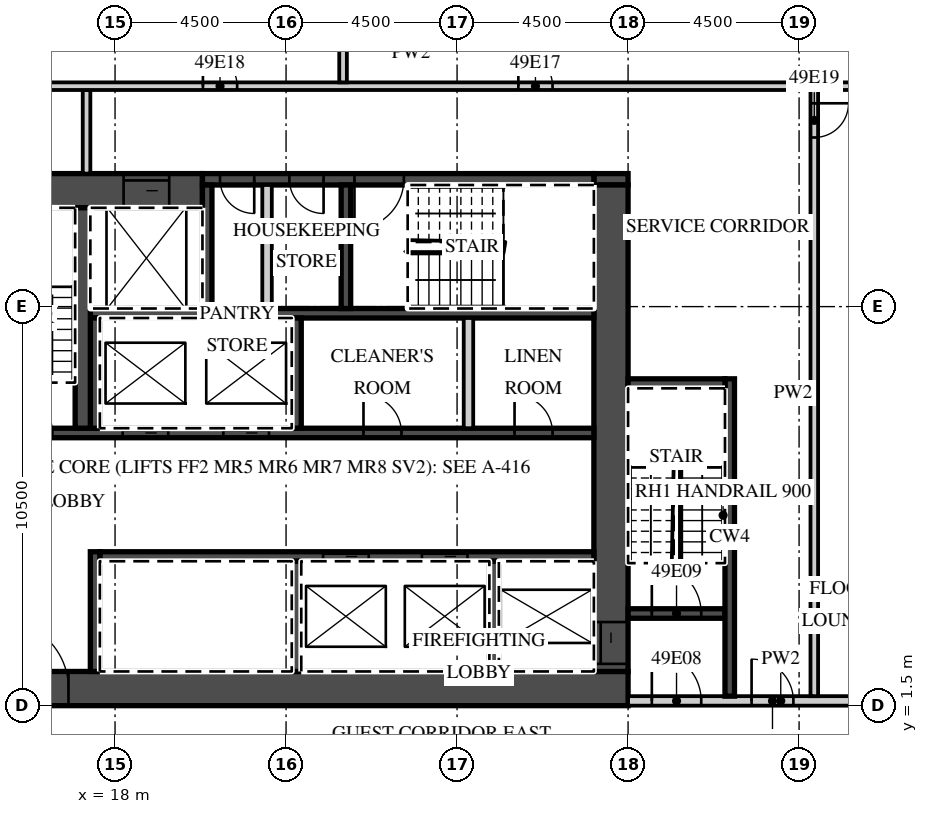
"""IFC4 building model, lengths in metres.
Left out: names, types, materials, properties, quantities, classifications, styles, units other than length and angle.
Written with IfcOpenShell. Run it as: python <this file> out.ifc"""

import sys

from ifc_helpers import new_model, si_unit, direction, frame, frame_2d, origin, place, context, subcontext, project, spatial, rectangle, extrude, element, fill, save


model = new_model("IFC4")
c1 = context("Model", 3, precision=1e-05, world=origin(), true_north=direction((0.0, 1.0)))
c2 = subcontext(c1, "Body", "Model", "MODEL_VIEW")
j1 = project(units=[si_unit("LENGTHUNIT", "METRE"), si_unit("PLANEANGLEUNIT", "RADIAN")], contexts=[c1])
p1 = place(None, origin())
s1 = spatial("IfcSite", under=j1, at=p1, CompositionType="ELEMENT")
p2 = place(p1, origin())
s2 = spatial("IfcBuilding", under=s1, at=p2, CompositionType="ELEMENT")
p3 = place(p2, frame((0.0, 0.0, 203.2)))
s3 = spatial("IfcBuildingStorey", under=s2, at=p3, CompositionType="ELEMENT", Elevation=203.2)
p4 = place(p3, frame((13.5, 1.95, 0.0), z_axis=(0.0, 0.0, 1.0), x_axis=(1.0, 0.0, 0.0)))
e1 = element("IfcWall", 1, at=p4, inside=s3, PredefinedType="SHEAR", context=c2, shape_type="SweptSolid", body=[
    extrude(rectangle(XDim=18.0, YDim=0.9, at=frame_2d((9.0, 0.0))), origin(), (0.0, 0.0, 1.0), 3.0),
])
p5 = place(p4, frame((1.475, 0.0, 0.0)))
e2 = element("IfcOpeningElement", 2, at=p5, cuts=e1, PredefinedType="OPENING", context=c2, shape_type="SweptSolid", body=[
    extrude(rectangle(XDim=1.8, YDim=2.1, at=frame_2d((0.9, 1.05))), frame((0.0, 0.46, 0.0), z_axis=(0.0, -1.0, 0.0), x_axis=(1.0, 0.0, 0.0)), (0.0, 0.0, 1.0), 0.92),
])
p6 = place(p3, frame((13.5, 15.05, 0.0), z_axis=(0.0, 0.0, 1.0), x_axis=(1.0, 0.0, 0.0)))
e3 = element("IfcWall", 3, at=p6, inside=s3, PredefinedType="SHEAR", context=c2, shape_type="SweptSolid", body=[
    extrude(rectangle(XDim=6.8, YDim=0.9, at=frame_2d((3.4, 0.0))), origin(), (0.0, 0.0, 1.0), 3.0),
])
p7 = place(p6, frame((4.725, 0.0, 0.0)))
e4 = element("IfcOpeningElement", 4, at=p7, cuts=e3, PredefinedType="OPENING", context=c2, shape_type="SweptSolid", body=[
    extrude(rectangle(XDim=1.2, YDim=2.1, at=frame_2d((0.6, 1.05))), frame((0.0, 0.46, 0.0), z_axis=(0.0, -1.0, 0.0), x_axis=(1.0, 0.0, 0.0)), (0.0, 0.0, 1.0), 0.92),
])
p8 = place(p3, frame((30.6, 15.35, 0.0), z_axis=(0.0, 0.0, 1.0), x_axis=(1.0, 0.0, 0.0)))
e5 = element("IfcWall", 5, at=p8, inside=s3, PredefinedType="SHEAR", context=c2, shape_type="SweptSolid", body=[
    extrude(rectangle(XDim=0.9, YDim=0.3, at=frame_2d((0.45, 0.0))), origin(), (0.0, 0.0, 1.0), 3.0),
])
p9 = place(p3, frame((20.3, 15.35, 0.0), z_axis=(0.0, 0.0, 1.0), x_axis=(1.0, 0.0, 0.0)))
e6 = element("IfcWall", 6, at=p9, inside=s3, PredefinedType="SHEAR", context=c2, shape_type="SweptSolid", body=[
    extrude(rectangle(XDim=10.3, YDim=0.3, at=frame_2d((5.15, 0.0))), origin(), (0.0, 0.0, 1.0), 3.0),
])
p10 = place(p9, frame((4.0, 0.0, 0.0)))
e7 = element("IfcOpeningElement", 7, at=p10, cuts=e6, PredefinedType="OPENING", context=c2, shape_type="SweptSolid", body=[
    extrude(rectangle(XDim=1.3, YDim=2.1, at=frame_2d((0.65, 1.05))), frame((0.0, 0.16, 0.0), z_axis=(0.0, -1.0, 0.0), x_axis=(1.0, 0.0, 0.0)), (0.0, 0.0, 1.0), 0.32),
])
p11 = place(p9, frame((2.288, 0.0, 0.0)))
e8 = element("IfcOpeningElement", 8, at=p11, cuts=e6, PredefinedType="OPENING", context=c2, shape_type="SweptSolid", body=[
    extrude(rectangle(XDim=0.9, YDim=2.1, at=frame_2d((0.45, 1.05))), frame((0.0, 0.16, 0.0), z_axis=(0.0, -1.0, 0.0), x_axis=(1.0, 0.0, 0.0)), (0.0, 0.0, 1.0), 0.32),
])
p12 = place(p9, frame((0.462, 0.0, 0.0)))
e9 = element("IfcOpeningElement", 9, at=p12, cuts=e6, PredefinedType="OPENING", context=c2, shape_type="SweptSolid", body=[
    extrude(rectangle(XDim=0.9, YDim=2.1, at=frame_2d((0.45, 1.05))), frame((0.0, 0.16, 0.0), z_axis=(0.0, -1.0, 0.0), x_axis=(1.0, 0.0, 0.0)), (0.0, 0.0, 1.0), 0.32),
])
p13 = place(p3, frame((31.05, 2.4, 0.0), z_axis=(0.0, 0.0, 1.0), x_axis=(0.0, 1.0, 0.0)))
e10 = element("IfcWall", 10, at=p13, inside=s3, PredefinedType="SHEAR", context=c2, shape_type="SweptSolid", body=[
    extrude(rectangle(XDim=12.8, YDim=0.9, at=frame_2d((6.4, 0.0))), origin(), (0.0, 0.0, 1.0), 3.0),
])
p14 = place(p13, frame((0.2, 0.0, 0.0)))
e11 = element("IfcOpeningElement", 11, at=p14, cuts=e10, PredefinedType="OPENING", context=c2, shape_type="SweptSolid", body=[
    extrude(rectangle(XDim=1.1, YDim=2.1, at=frame_2d((0.55, 1.05))), frame((0.0, 0.46, 0.0), z_axis=(0.0, -1.0, 0.0), x_axis=(1.0, 0.0, 0.0)), (0.0, 0.0, 1.0), 0.92),
])
p15 = place(p3, frame((17.6, 5.425, 0.0), z_axis=(0.0, 0.0, 1.0), x_axis=(1.0, 0.0, 0.0)))
e12 = element("IfcWall", 12, at=p15, inside=s3, PredefinedType="SHEAR", context=c2, shape_type="SweptSolid", body=[
    extrude(rectangle(XDim=13.0, YDim=0.25, at=frame_2d((6.5, 0.0))), origin(), (0.0, 0.0, 1.0), 3.0),
])
p16 = place(p15, frame((8.475, 0.0, 0.0)))
e13 = element("IfcOpeningElement", 13, at=p16, cuts=e12, PredefinedType="OPENING", context=c2, shape_type="SweptSolid", body=[
    extrude(rectangle(XDim=1.2, YDim=2.1, at=frame_2d((0.6, 1.05))), frame((0.0, 0.135, 0.0), z_axis=(0.0, -1.0, 0.0), x_axis=(1.0, 0.0, 0.0)), (0.0, 0.0, 1.0), 0.27),
])
p17 = place(p15, frame((5.875, 0.0, 0.0)))
e14 = element("IfcOpeningElement", 14, at=p17, cuts=e12, PredefinedType="OPENING", context=c2, shape_type="SweptSolid", body=[
    extrude(rectangle(XDim=1.2, YDim=2.1, at=frame_2d((0.6, 1.05))), frame((0.0, 0.135, 0.0), z_axis=(0.0, -1.0, 0.0), x_axis=(1.0, 0.0, 0.0)), (0.0, 0.0, 1.0), 0.27),
])
p18 = place(p3, frame((17.475, 2.4, 0.0), z_axis=(0.0, 0.0, 1.0), x_axis=(0.0, 1.0, 0.0)))
e15 = element("IfcWall", 15, at=p18, inside=s3, PredefinedType="SHEAR", context=c2, shape_type="SweptSolid", body=[
    extrude(rectangle(XDim=3.15, YDim=0.25, at=frame_2d((1.575, 0.0))), origin(), (0.0, 0.0, 1.0), 3.0),
])
for number, where, z_axis, x_axis in (
    (16, (27.975, 2.4, 0.0), (0.0, 0.0, 1.0), (0.0, 1.0, 0.0)),
    (17, (22.775, 2.4, 0.0), (0.0, 0.0, 1.0), (0.0, 1.0, 0.0)),
):
    element("IfcWall", number, at=place(p3, frame(where, z_axis=z_axis, x_axis=x_axis)), inside=s3, PredefinedType="SHEAR", context=c2, shape_type="SweptSolid", body=[
        extrude(rectangle(XDim=2.9, YDim=0.25, at=frame_2d((1.45, 0.0))), origin(), (0.0, 0.0, 1.0), 3.0),
    ])
p19 = place(p3, frame((14.4, 8.675, 0.0), z_axis=(0.0, 0.0, 1.0), x_axis=(1.0, 0.0, 0.0)))
e18 = element("IfcWall", 18, at=p19, inside=s3, PredefinedType="SHEAR", context=c2, shape_type="SweptSolid", body=[
    extrude(rectangle(XDim=16.2, YDim=0.25, at=frame_2d((8.1, 0.0))), origin(), (0.0, 0.0, 1.0), 3.0),
])
p20 = place(p19, frame((6.45, 0.0, 0.0)))
e19 = element("IfcOpeningElement", 19, at=p20, cuts=e18, PredefinedType="OPENING", context=c2, shape_type="SweptSolid", body=[
    extrude(rectangle(XDim=1.2, YDim=2.1, at=frame_2d((0.6, 1.05))), frame((0.0, 0.135, 0.0), z_axis=(0.0, -1.0, 0.0), x_axis=(1.0, 0.0, 0.0)), (0.0, 0.0, 1.0), 0.27),
])
p21 = place(p19, frame((3.8, 0.0, 0.0)))
e20 = element("IfcOpeningElement", 20, at=p21, cuts=e18, PredefinedType="OPENING", context=c2, shape_type="SweptSolid", body=[
    extrude(rectangle(XDim=1.2, YDim=2.1, at=frame_2d((0.6, 1.05))), frame((0.0, 0.135, 0.0), z_axis=(0.0, -1.0, 0.0), x_axis=(1.0, 0.0, 0.0)), (0.0, 0.0, 1.0), 0.27),
])
p22 = place(p19, frame((0.65, 0.0, 0.0)))
e21 = element("IfcOpeningElement", 21, at=p22, cuts=e18, PredefinedType="OPENING", context=c2, shape_type="SweptSolid", body=[
    extrude(rectangle(XDim=1.3, YDim=2.1, at=frame_2d((0.65, 1.05))), frame((0.0, 0.135, 0.0), z_axis=(0.0, -1.0, 0.0), x_axis=(1.0, 0.0, 0.0)), (0.0, 0.0, 1.0), 0.27),
])
p23 = place(p19, frame((14.113, 0.0, 0.0)))
e22 = element("IfcOpeningElement", 22, at=p23, cuts=e18, PredefinedType="OPENING", context=c2, shape_type="SweptSolid", body=[
    extrude(rectangle(XDim=1.0, YDim=2.1, at=frame_2d((0.5, 1.05))), frame((0.0, 0.135, 0.0), z_axis=(0.0, -1.0, 0.0), x_axis=(1.0, 0.0, 0.0)), (0.0, 0.0, 1.0), 0.27),
])
p24 = place(p19, frame((10.137, 0.0, 0.0)))
e23 = element("IfcOpeningElement", 23, at=p24, cuts=e18, PredefinedType="OPENING", context=c2, shape_type="SweptSolid", body=[
    extrude(rectangle(XDim=1.0, YDim=2.1, at=frame_2d((0.5, 1.05))), frame((0.0, 0.135, 0.0), z_axis=(0.0, -1.0, 0.0), x_axis=(1.0, 0.0, 0.0)), (0.0, 0.0, 1.0), 0.27),
])
p25 = place(p3, frame((17.35, 11.825, 0.0), z_axis=(0.0, 0.0, 1.0), x_axis=(1.0, 0.0, 0.0)))
e24 = element("IfcWall", 24, at=p25, inside=s3, PredefinedType="SHEAR", context=c2, shape_type="SweptSolid", body=[
    extrude(rectangle(XDim=13.25, YDim=0.25, at=frame_2d((6.625, 0.0))), origin(), (0.0, 0.0, 1.0), 3.0),
])
for number, where, z_axis, x_axis in (
    (25, (17.475, 8.8, 0.0), (0.0, 0.0, 1.0), (0.0, 1.0, 0.0)),
    (26, (22.775, 8.8, 0.0), (0.0, 0.0, 1.0), (0.0, 1.0, 0.0)),
):
    element("IfcWall", number, at=place(p3, frame(where, z_axis=z_axis, x_axis=x_axis)), inside=s3, PredefinedType="SHEAR", context=c2, shape_type="SweptSolid", body=[
        extrude(rectangle(XDim=2.9, YDim=0.25, at=frame_2d((1.45, 0.0))), origin(), (0.0, 0.0, 1.0), 3.0),
    ])
p26 = place(p3, frame((27.3, 8.8, 0.0), z_axis=(0.0, 0.0, 1.0), x_axis=(0.0, 1.0, 0.0)))
e27 = element("IfcWall", 27, at=p26, inside=s3, PredefinedType="PARTITIONING", context=c2, shape_type="SweptSolid", body=[
    extrude(rectangle(XDim=2.9, YDim=0.25, at=frame_2d((1.45, 0.0))), origin(), (0.0, 0.0, 1.0), 3.0),
])
p27 = place(p3, frame((17.15, 8.8, 0.0), z_axis=(0.0, 0.0, 1.0), x_axis=(0.0, 1.0, 0.0)))
e28 = element("IfcWall", 28, at=p27, inside=s3, PredefinedType="SHEAR", context=c2, shape_type="SweptSolid", body=[
    extrude(rectangle(XDim=5.8, YDim=0.4, at=frame_2d((2.9, 0.0))), origin(), (0.0, 0.0, 1.0), 3.0),
])
for number, where, z_axis, x_axis in (
    (29, (20.425, 11.95, 0.0), (0.0, 0.0, 1.0), (0.0, 1.0, 0.0)),
    (30, (24.075, 11.95, 0.0), (0.0, 0.0, 1.0), (0.0, 1.0, 0.0)),
):
    element("IfcWall", number, at=place(p3, frame(where, z_axis=z_axis, x_axis=x_axis)), inside=s3, PredefinedType="SHEAR", context=c2, shape_type="SweptSolid", body=[
        extrude(rectangle(XDim=3.25, YDim=0.25, at=frame_2d((1.625, 0.0))), origin(), (0.0, 0.0, 1.0), 3.0),
    ])
p28 = place(p3, frame((22.0, 11.95, 0.0), z_axis=(0.0, 0.0, 1.0), x_axis=(0.0, 1.0, 0.0)))
e31 = element("IfcWall", 31, at=p28, inside=s3, PredefinedType="PARTITIONING", context=c2, shape_type="SweptSolid", body=[
    extrude(rectangle(XDim=3.25, YDim=0.25, at=frame_2d((1.625, 0.0))), origin(), (0.0, 0.0, 1.0), 3.0),
])
p29 = place(p3, frame((31.5, 1.625, 0.0), z_axis=(0.0, 0.0, 1.0), x_axis=(1.0, 0.0, 0.0)))
e32 = element("IfcWall", 32, at=p29, inside=s3, PredefinedType="PARTITIONING", context=c2, shape_type="SweptSolid", body=[
    extrude(rectangle(XDim=8.035, YDim=0.25, at=frame_2d((4.018, 0.0))), origin(), (0.0, 0.0, 1.0), 3.0),
])
p30 = place(p29, frame((0.625, 0.0, 0.0)))
e33 = element("IfcOpeningElement", 33, at=p30, cuts=e32, PredefinedType="OPENING", context=c2, shape_type="SweptSolid", body=[
    extrude(rectangle(XDim=1.3, YDim=2.1, at=frame_2d((0.65, 1.05))), frame((0.0, 0.135, 0.0), z_axis=(0.0, -1.0, 0.0), x_axis=(1.0, 0.0, 0.0)), (0.0, 0.0, 1.0), 0.27),
])
p31 = place(p29, frame((3.25, 0.0, 0.0)))
e34 = element("IfcOpeningElement", 34, at=p31, cuts=e32, PredefinedType="OPENING", context=c2, shape_type="SweptSolid", body=[
    extrude(rectangle(XDim=1.1, YDim=2.1, at=frame_2d((0.55, 1.05))), frame((0.0, 0.135, 0.0), z_axis=(0.0, -1.0, 0.0), x_axis=(1.0, 0.0, 0.0)), (0.0, 0.0, 1.0), 0.27),
])
p32 = place(p3, frame((31.5, 3.925, 0.0), z_axis=(0.0, 0.0, 1.0), x_axis=(1.0, 0.0, 0.0)))
e35 = element("IfcWall", 35, at=p32, inside=s3, PredefinedType="SHEAR", context=c2, shape_type="SweptSolid", body=[
    extrude(rectangle(XDim=2.55, YDim=0.25, at=frame_2d((1.275, 0.0))), origin(), (0.0, 0.0, 1.0), 3.0),
])
p33 = place(p32, frame((0.625, 0.0, 0.0)))
e36 = element("IfcOpeningElement", 36, at=p33, cuts=e35, PredefinedType="OPENING", context=c2, shape_type="SweptSolid", body=[
    extrude(rectangle(XDim=1.3, YDim=2.1, at=frame_2d((0.65, 1.05))), frame((0.0, 0.135, 0.0), z_axis=(0.0, -1.0, 0.0), x_axis=(1.0, 0.0, 0.0)), (0.0, 0.0, 1.0), 0.27),
])
p34 = place(p3, frame((34.175, 1.75, 0.0), z_axis=(0.0, 0.0, 1.0), x_axis=(0.0, 1.0, 0.0)))
e37 = element("IfcWall", 37, at=p34, inside=s3, PredefinedType="SHEAR", context=c2, shape_type="SweptSolid", body=[
    extrude(rectangle(XDim=8.35, YDim=0.25, at=frame_2d((4.175, 0.0))), origin(), (0.0, 0.0, 1.0), 3.0),
])
p35 = place(p3, frame((31.5, 9.975, 0.0), z_axis=(0.0, 0.0, 1.0), x_axis=(1.0, 0.0, 0.0)))
e38 = element("IfcWall", 38, at=p35, inside=s3, PredefinedType="SHEAR", context=c2, shape_type="SweptSolid", body=[
    extrude(rectangle(XDim=2.55, YDim=0.25, at=frame_2d((1.275, 0.0))), origin(), (0.0, 0.0, 1.0), 3.0),
])
p36 = place(p3, frame((17.25, 15.5, 0.0), z_axis=(0.0, 0.0, 1.0), x_axis=(0.0, 1.0, 0.0)))
e39 = element("IfcWall", 39, at=p36, inside=s3, PredefinedType="PARTITIONING", context=c2, shape_type="SweptSolid", body=[
    extrude(rectangle(XDim=2.2, YDim=0.2, at=frame_2d((1.1, 0.0))), origin(), (0.0, 0.0, 1.0), 3.0),
])
p37 = place(p3, frame((36.4, 1.75, 0.0), z_axis=(0.0, 0.0, 1.0), x_axis=(0.0, 1.0, 0.0)))
e40 = element("IfcWall", 40, at=p37, inside=s3, PredefinedType="PARTITIONING", context=c2, shape_type="SweptSolid", body=[
    extrude(rectangle(XDim=15.95, YDim=0.2, at=frame_2d((7.975, 0.0))), origin(), (0.0, 0.0, 1.0), 3.0),
])
p38 = place(p37, frame((14.7, 0.0, 0.0)))
e41 = element("IfcOpeningElement", 41, at=p38, cuts=e40, PredefinedType="OPENING", context=c2, shape_type="SweptSolid", body=[
    extrude(rectangle(XDim=0.9, YDim=2.1, at=frame_2d((0.45, 1.05))), frame((0.0, 0.11, 0.0), z_axis=(0.0, -1.0, 0.0), x_axis=(1.0, 0.0, 0.0)), (0.0, 0.0, 1.0), 0.22),
])
p39 = place(p3, frame((13.6, 17.8, 0.0), z_axis=(0.0, 0.0, 1.0), x_axis=(1.0, 0.0, 0.0)))
e42 = element("IfcWall", 42, at=p39, inside=s3, PredefinedType="PARTITIONING", context=c2, shape_type="SweptSolid", body=[
    extrude(rectangle(XDim=24.378, YDim=0.2, at=frame_2d((12.189, 0.0))), origin(), (0.0, 0.0, 1.0), 3.0),
])
p40 = place(p39, frame((15.012, 0.0, 0.0)))
e43 = element("IfcOpeningElement", 43, at=p40, cuts=e42, PredefinedType="OPENING", context=c2, shape_type="SweptSolid", body=[
    extrude(rectangle(XDim=0.9, YDim=2.1, at=frame_2d((0.45, 1.05))), frame((0.0, 0.11, 0.0), z_axis=(0.0, -1.0, 0.0), x_axis=(1.0, 0.0, 0.0)), (0.0, 0.0, 1.0), 0.22),
])
p41 = place(p39, frame((6.712, 0.0, 0.0)))
e44 = element("IfcOpeningElement", 44, at=p41, cuts=e42, PredefinedType="OPENING", context=c2, shape_type="SweptSolid", body=[
    extrude(rectangle(XDim=0.9, YDim=2.1, at=frame_2d((0.45, 1.05))), frame((0.0, 0.11, 0.0), z_axis=(0.0, -1.0, 0.0), x_axis=(1.0, 0.0, 0.0)), (0.0, 0.0, 1.0), 0.22),
])
p42 = place(p3, frame((24.0, 17.9, 0.0), z_axis=(0.0, 0.0, 1.0), x_axis=(0.0, 1.0, 0.0)))
e45 = element("IfcWall", 45, at=p42, inside=s3, PredefinedType="PARTITIONING", context=c2, shape_type="SweptSolid", body=[
    extrude(rectangle(XDim=4.701, YDim=0.2, at=frame_2d((2.351, 0.0))), origin(), (0.0, 0.0, 1.0), 3.0),
])
p43 = place(p20, origin())
e46 = element("IfcDoor", 46, at=p43, inside=s3, OperationType="SLIDING_TO_LEFT", PredefinedType="DOOR", context=c2, shape_type="SweptSolid", body=[
    extrude(rectangle(XDim=1.2, YDim=2.1, at=frame_2d((0.6, 1.05))), frame((0.0, 0.025, 0.0), z_axis=(0.0, -1.0, 0.0), x_axis=(1.0, 0.0, 0.0)), (0.0, 0.0, 1.0), 0.05),
])
fill(e19, e46)
p44 = place(p21, origin())
e47 = element("IfcDoor", 47, at=p44, inside=s3, OperationType="SLIDING_TO_RIGHT", PredefinedType="DOOR", context=c2, shape_type="SweptSolid", body=[
    extrude(rectangle(XDim=1.2, YDim=2.1, at=frame_2d((0.6, 1.05))), frame((0.0, 0.025, 0.0), z_axis=(0.0, -1.0, 0.0), x_axis=(1.0, 0.0, 0.0)), (0.0, 0.0, 1.0), 0.05),
])
fill(e20, e47)
p45 = place(p16, origin())
e48 = element("IfcDoor", 48, at=p45, inside=s3, OperationType="SLIDING_TO_LEFT", PredefinedType="DOOR", context=c2, shape_type="SweptSolid", body=[
    extrude(rectangle(XDim=1.2, YDim=2.1, at=frame_2d((0.6, 1.05))), frame((0.0, 0.025, 0.0), z_axis=(0.0, -1.0, 0.0), x_axis=(1.0, 0.0, 0.0)), (0.0, 0.0, 1.0), 0.05),
])
fill(e13, e48)
p46 = place(p17, origin())
e49 = element("IfcDoor", 49, at=p46, inside=s3, OperationType="SLIDING_TO_RIGHT", PredefinedType="DOOR", context=c2, shape_type="SweptSolid", body=[
    extrude(rectangle(XDim=1.2, YDim=2.1, at=frame_2d((0.6, 1.05))), frame((0.0, 0.025, 0.0), z_axis=(0.0, -1.0, 0.0), x_axis=(1.0, 0.0, 0.0)), (0.0, 0.0, 1.0), 0.05),
])
fill(e14, e49)
p47 = place(p7, origin())
e50 = element("IfcDoor", 50, at=p47, inside=s3, OperationType="SLIDING_TO_LEFT", PredefinedType="DOOR", context=c2, shape_type="SweptSolid", body=[
    extrude(rectangle(XDim=1.2, YDim=2.1, at=frame_2d((0.6, 1.05))), frame((0.0, 0.025, 0.0), z_axis=(0.0, -1.0, 0.0), x_axis=(1.0, 0.0, 0.0)), (0.0, 0.0, 1.0), 0.05),
])
fill(e4, e50)
p48 = place(p14, origin())
e51 = element("IfcDoor", 51, at=p48, inside=s3, OperationType="SLIDING_TO_LEFT", PredefinedType="DOOR", context=c2, shape_type="SweptSolid", body=[
    extrude(rectangle(XDim=1.1, YDim=2.1, at=frame_2d((0.55, 1.05))), frame((0.0, 0.025, 0.0), z_axis=(0.0, -1.0, 0.0), x_axis=(1.0, 0.0, 0.0)), (0.0, 0.0, 1.0), 0.05),
])
fill(e11, e51)
p49 = place(p5, origin())
e52 = element("IfcDoor", 52, at=p49, inside=s3, OperationType="DOUBLE_DOOR_DOUBLE_SWING", PredefinedType="DOOR", context=c2, shape_type="SweptSolid", body=[
    extrude(rectangle(XDim=1.8, YDim=2.1, at=frame_2d((0.9, 1.05))), frame((0.0, 0.025, 0.0), z_axis=(0.0, -1.0, 0.0), x_axis=(1.0, 0.0, 0.0)), (0.0, 0.0, 1.0), 0.05),
])
fill(e2, e52)
p50 = place(p30, origin())
e53 = element("IfcDoor", 53, at=p50, inside=s3, OperationType="SINGLE_SWING_LEFT", PredefinedType="DOOR", context=c2, shape_type="SweptSolid", body=[
    extrude(rectangle(XDim=1.3, YDim=2.1, at=frame_2d((0.65, 1.05))), frame((0.0, 0.025, 0.0), z_axis=(0.0, -1.0, 0.0), x_axis=(1.0, 0.0, 0.0)), (0.0, 0.0, 1.0), 0.05),
])
fill(e33, e53)
p51 = place(p33, origin())
e54 = element("IfcDoor", 54, at=p51, inside=s3, OperationType="SINGLE_SWING_LEFT", PredefinedType="DOOR", context=c2, shape_type="SweptSolid", body=[
    extrude(rectangle(XDim=1.3, YDim=2.1, at=frame_2d((0.65, 1.05))), frame((0.0, 0.025, 0.0), z_axis=(0.0, -1.0, 0.0), x_axis=(1.0, 0.0, 0.0)), (0.0, 0.0, 1.0), 0.05),
])
fill(e36, e54)
p52 = place(p31, origin())
e55 = element("IfcDoor", 55, at=p52, inside=s3, OperationType="SINGLE_SWING_LEFT", PredefinedType="DOOR", context=c2, shape_type="SweptSolid", body=[
    extrude(rectangle(XDim=1.1, YDim=2.1, at=frame_2d((0.55, 1.05))), frame((0.0, 0.025, 0.0), z_axis=(0.0, -1.0, 0.0), x_axis=(1.0, 0.0, 0.0)), (0.0, 0.0, 1.0), 0.05),
])
fill(e34, e55)
p53 = place(p10, origin())
e56 = element("IfcDoor", 56, at=p53, inside=s3, OperationType="SINGLE_SWING_LEFT", PredefinedType="DOOR", context=c2, shape_type="SweptSolid", body=[
    extrude(rectangle(XDim=1.3, YDim=2.1, at=frame_2d((0.65, 1.05))), frame((0.0, 0.025, 0.0), z_axis=(0.0, -1.0, 0.0), x_axis=(1.0, 0.0, 0.0)), (0.0, 0.0, 1.0), 0.05),
])
fill(e7, e56)
p54 = place(p11, origin())
e57 = element("IfcDoor", 57, at=p54, inside=s3, OperationType="SINGLE_SWING_RIGHT", PredefinedType="DOOR", context=c2, shape_type="SweptSolid", body=[
    extrude(rectangle(XDim=0.9, YDim=2.1, at=frame_2d((0.45, 1.05))), frame((0.0, 0.025, 0.0), z_axis=(0.0, -1.0, 0.0), x_axis=(1.0, 0.0, 0.0)), (0.0, 0.0, 1.0), 0.05),
])
fill(e8, e57)
p55 = place(p12, origin())
e58 = element("IfcDoor", 58, at=p55, inside=s3, OperationType="SINGLE_SWING_RIGHT", PredefinedType="DOOR", context=c2, shape_type="SweptSolid", body=[
    extrude(rectangle(XDim=0.9, YDim=2.1, at=frame_2d((0.45, 1.05))), frame((0.0, 0.025, 0.0), z_axis=(0.0, -1.0, 0.0), x_axis=(1.0, 0.0, 0.0)), (0.0, 0.0, 1.0), 0.05),
])
fill(e9, e58)
p56 = place(p23, origin())
e59 = element("IfcDoor", 59, at=p56, inside=s3, OperationType="SINGLE_SWING_LEFT", PredefinedType="DOOR", context=c2, shape_type="SweptSolid", body=[
    extrude(rectangle(XDim=1.0, YDim=2.1, at=frame_2d((0.5, 1.05))), frame((0.0, 0.025, 0.0), z_axis=(0.0, -1.0, 0.0), x_axis=(1.0, 0.0, 0.0)), (0.0, 0.0, 1.0), 0.05),
])
fill(e22, e59)
p57 = place(p24, origin())
e60 = element("IfcDoor", 60, at=p57, inside=s3, OperationType="SINGLE_SWING_LEFT", PredefinedType="DOOR", context=c2, shape_type="SweptSolid", body=[
    extrude(rectangle(XDim=1.0, YDim=2.1, at=frame_2d((0.5, 1.05))), frame((0.0, 0.025, 0.0), z_axis=(0.0, -1.0, 0.0), x_axis=(1.0, 0.0, 0.0)), (0.0, 0.0, 1.0), 0.05),
])
fill(e23, e60)
p58 = place(p40, origin())
e61 = element("IfcDoor", 61, at=p58, inside=s3, OperationType="SINGLE_SWING_LEFT", PredefinedType="DOOR", context=c2, shape_type="SweptSolid", body=[
    extrude(rectangle(XDim=0.9, YDim=2.1, at=frame_2d((0.45, 1.05))), frame((0.0, 0.025, 0.0), z_axis=(0.0, -1.0, 0.0), x_axis=(1.0, 0.0, 0.0)), (0.0, 0.0, 1.0), 0.05),
])
fill(e43, e61)
p59 = place(p41, origin())
e62 = element("IfcDoor", 62, at=p59, inside=s3, OperationType="SINGLE_SWING_LEFT", PredefinedType="DOOR", context=c2, shape_type="SweptSolid", body=[
    extrude(rectangle(XDim=0.9, YDim=2.1, at=frame_2d((0.45, 1.05))), frame((0.0, 0.025, 0.0), z_axis=(0.0, -1.0, 0.0), x_axis=(1.0, 0.0, 0.0)), (0.0, 0.0, 1.0), 0.05),
])
fill(e44, e62)
p60 = place(p38, origin())
e63 = element("IfcDoor", 63, at=p60, inside=s3, OperationType="SINGLE_SWING_RIGHT", PredefinedType="DOOR", context=c2, shape_type="SweptSolid", body=[
    extrude(rectangle(XDim=0.9, YDim=2.1, at=frame_2d((0.45, 1.05))), frame((0.0, 0.025, 0.0), z_axis=(0.0, -1.0, 0.0), x_axis=(1.0, 0.0, 0.0)), (0.0, 0.0, 1.0), 0.05),
])
fill(e41, e63)
save(model, sys.argv[1])
